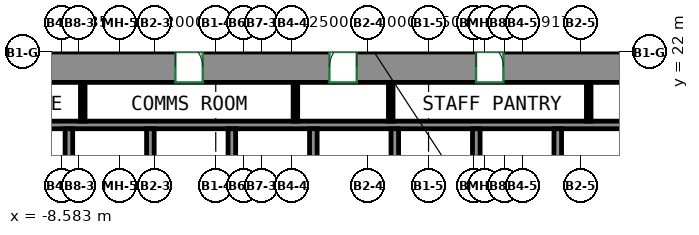
"""IFC4 building model, lengths in metres.
Left out: names, types, materials, properties, quantities, classifications, styles, units other than length and angle.
Written with IfcOpenShell. Run it as: python <this file> out.ifc"""

import sys

from ifc_helpers import new_model, si_unit, direction, frame, frame_2d, origin, place, context, subcontext, project, spatial, rectangle, extrude, source, transform, mapped, element, fill, save


model = new_model("IFC4")
c1 = context("Model", 3, precision=1e-05, world=origin(), true_north=direction((0.0, 1.0)))
c2 = subcontext(c1, "Body", "Model", "MODEL_VIEW")
j1 = project(units=[si_unit("LENGTHUNIT", "METRE"), si_unit("PLANEANGLEUNIT", "RADIAN")], contexts=[c1])
p1 = place(None, origin())
s1 = spatial("IfcSite", under=j1, at=p1, CompositionType="ELEMENT")
p2 = place(p1, origin())
s2 = spatial("IfcBuilding", under=s1, at=p2, CompositionType="ELEMENT")
p3 = place(p2, frame((0.0, 0.0, 27.0)))
s3 = spatial("IfcBuildingStorey", under=s2, at=p3, CompositionType="ELEMENT", Elevation=27.0)
m1 = source(origin(), c2, "Body", "SweptSolid", [
    extrude(rectangle(XDim=34.1, YDim=1.0, at=frame_2d((17.05, 0.0))), origin(), (0.0, 0.0, 1.0), 3.72),
])
p4 = place(p3, frame((-16.0, 21.5, 0.0), z_axis=(0.0, 0.0, 1.0), x_axis=(1.0, 0.0, 0.0)))
e1 = element("IfcWall", 1, at=p4, inside=s3, PredefinedType="SHEAR", context=c2, shape_type="MappedRepresentation", body=[
    mapped(m1, transform((0.0, 0.0, 0.0))),
])
p5 = place(p4, frame((6.108, 0.0, 0.0)))
e2 = element("IfcOpeningElement", 2, at=p5, cuts=e1, PredefinedType="OPENING", context=c2, shape_type="SweptSolid", body=[
    extrude(rectangle(XDim=0.9, YDim=2.1, at=frame_2d((0.45, 1.05))), frame((0.0, 0.51, 0.0), z_axis=(0.0, -1.0, 0.0), x_axis=(1.0, 0.0, 0.0)), (0.0, 0.0, 1.0), 1.02),
])
p6 = place(p4, frame((11.173, 0.0, 0.0)))
e3 = element("IfcOpeningElement", 3, at=p6, cuts=e1, PredefinedType="OPENING", context=c2, shape_type="SweptSolid", body=[
    extrude(rectangle(XDim=0.9, YDim=2.1, at=frame_2d((0.45, 1.05))), frame((0.0, 0.51, 0.0), z_axis=(0.0, -1.0, 0.0), x_axis=(1.0, 0.0, 0.0)), (0.0, 0.0, 1.0), 1.02),
])
p7 = place(p4, frame((16.238, 0.0, 0.0)))
e4 = element("IfcOpeningElement", 4, at=p7, cuts=e1, PredefinedType="OPENING", context=c2, shape_type="SweptSolid", body=[
    extrude(rectangle(XDim=0.9, YDim=2.1, at=frame_2d((0.45, 1.05))), frame((0.0, 0.51, 0.0), z_axis=(0.0, -1.0, 0.0), x_axis=(1.0, 0.0, 0.0)), (0.0, 0.0, 1.0), 1.02),
])
p8 = place(p4, frame((21.062, 0.0, 0.0)))
e5 = element("IfcOpeningElement", 5, at=p8, cuts=e1, PredefinedType="OPENING", context=c2, shape_type="SweptSolid", body=[
    extrude(rectangle(XDim=0.9, YDim=2.1, at=frame_2d((0.45, 1.05))), frame((0.0, 0.51, 0.0), z_axis=(0.0, -1.0, 0.0), x_axis=(1.0, 0.0, 0.0)), (0.0, 0.0, 1.0), 1.02),
])
p9 = place(p4, frame((26.489, 0.0, 0.0)))
e6 = element("IfcOpeningElement", 6, at=p9, cuts=e1, PredefinedType="OPENING", context=c2, shape_type="SweptSolid", body=[
    extrude(rectangle(XDim=0.9, YDim=2.1, at=frame_2d((0.45, 1.05))), frame((0.0, 0.51, 0.0), z_axis=(0.0, -1.0, 0.0), x_axis=(1.0, 0.0, 0.0)), (0.0, 0.0, 1.0), 1.02),
])
p10 = place(p4, frame((2.525, 0.0, 0.0)))
e7 = element("IfcOpeningElement", 7, at=p10, cuts=e1, PredefinedType="OPENING", context=c2, shape_type="SweptSolid", body=[
    extrude(rectangle(XDim=0.9, YDim=2.1, at=frame_2d((0.45, 1.05))), frame((0.0, 0.51, 0.0), z_axis=(0.0, -1.0, 0.0), x_axis=(1.0, 0.0, 0.0)), (0.0, 0.0, 1.0), 1.02),
])
p11 = place(p4, frame((30.675, 0.0, 0.0)))
e8 = element("IfcOpeningElement", 8, at=p11, cuts=e1, PredefinedType="OPENING", context=c2, shape_type="SweptSolid", body=[
    extrude(rectangle(XDim=0.9, YDim=2.1, at=frame_2d((0.45, 1.05))), frame((0.0, 0.51, 0.0), z_axis=(0.0, -1.0, 0.0), x_axis=(1.0, 0.0, 0.0)), (0.0, 0.0, 1.0), 1.02),
])
m2 = source(origin(), c2, "Body", "SweptSolid", [
    extrude(rectangle(XDim=24.37, YDim=0.25, at=frame_2d((12.185, 0.0))), origin(), (0.0, 0.0, 1.0), 3.72),
])
p12 = place(p3, frame((-11.135, 19.6, 0.0), z_axis=(0.0, 0.0, 1.0), x_axis=(1.0, 0.0, 0.0)))
e9 = element("IfcWall", 9, at=p12, inside=s3, PredefinedType="PARTITIONING", context=c2, shape_type="MappedRepresentation", body=[
    mapped(m2, transform((0.0, 0.0, 0.0))),
])
m3 = source(origin(), c2, "Body", "SweptSolid", [
    extrude(rectangle(XDim=3.275, YDim=0.25, at=frame_2d((1.638, 0.0))), origin(), (0.0, 0.0, 1.0), 3.72),
])
for number, where, z_axis, x_axis in (
    (10, (2.39, 16.2, 0.0), (0.0, 0.0, 1.0), (0.0, 1.0, 0.0)),
    (11, (5.07, 16.2, 0.0), (0.0, 0.0, 1.0), (0.0, 1.0, 0.0)),
    (12, (7.75, 16.2, 0.0), (0.0, 0.0, 1.0), (0.0, 1.0, 0.0)),
    (13, (-0.29, 16.2, 0.0), (0.0, 0.0, 1.0), (0.0, 1.0, 0.0)),
    (14, (-2.97, 16.2, 0.0), (0.0, 0.0, 1.0), (0.0, 1.0, 0.0)),
    (15, (-5.65, 16.2, 0.0), (0.0, 0.0, 1.0), (0.0, 1.0, 0.0)),
    (16, (-8.33, 16.2, 0.0), (0.0, 0.0, 1.0), (0.0, 1.0, 0.0)),
):
    element("IfcWall", number, at=place(p3, frame(where, z_axis=z_axis, x_axis=x_axis)), inside=s3, PredefinedType="PARTITIONING", context=c2, shape_type="MappedRepresentation", body=[
        mapped(m3, transform((0.0, 0.0, 0.0))),
    ])
m4 = source(origin(), c2, "Body", "SweptSolid", [
    extrude(rectangle(XDim=1.275, YDim=0.15, at=frame_2d((0.637, 0.0))), origin(), (0.0, 0.0, 1.0), 3.72),
])
for number, where, z_axis, x_axis in (
    (17, (-7.875, 19.725, 0.0), (0.0, 0.0, 1.0), (0.0, 1.0, 0.0)),
    (18, (-0.88, 19.725, 0.0), (0.0, 0.0, 1.0), (0.0, 1.0, 0.0)),
    (19, (2.256, 19.725, 0.0), (0.0, 0.0, 1.0), (0.0, 1.0, 0.0)),
    (20, (8.768, 19.725, 0.0), (0.0, 0.0, 1.0), (0.0, 1.0, 0.0)),
):
    element("IfcWall", number, at=place(p3, frame(where, z_axis=z_axis, x_axis=x_axis)), inside=s3, PredefinedType="PARTITIONING", context=c2, shape_type="MappedRepresentation", body=[
        mapped(m4, transform((0.0, 0.0, 0.0))),
    ])
p13 = place(p6, origin())
e21 = element("IfcDoor", 21, at=p13, inside=s3, OperationType="SINGLE_SWING_LEFT", PredefinedType="DOOR", context=c2, shape_type="SweptSolid", body=[
    extrude(rectangle(XDim=0.9, YDim=2.1, at=frame_2d((0.45, 1.05))), frame((0.0, -0.355, 0.0), z_axis=(0.0, -1.0, 0.0), x_axis=(1.0, 0.0, 0.0)), (0.0, 0.0, 1.0), 0.05),
])
fill(e3, e21)
p14 = place(p7, origin())
e22 = element("IfcDoor", 22, at=p14, inside=s3, OperationType="SINGLE_SWING_RIGHT", PredefinedType="DOOR", context=c2, shape_type="SweptSolid", body=[
    extrude(rectangle(XDim=0.9, YDim=2.1, at=frame_2d((0.45, 1.05))), frame((0.0, -0.355, 0.0), z_axis=(0.0, -1.0, 0.0), x_axis=(1.0, 0.0, 0.0)), (0.0, 0.0, 1.0), 0.05),
])
fill(e4, e22)
p15 = place(p8, origin())
e23 = element("IfcDoor", 23, at=p15, inside=s3, OperationType="SINGLE_SWING_LEFT", PredefinedType="DOOR", context=c2, shape_type="SweptSolid", body=[
    extrude(rectangle(XDim=0.9, YDim=2.1, at=frame_2d((0.45, 1.05))), frame((0.0, -0.355, 0.0), z_axis=(0.0, -1.0, 0.0), x_axis=(1.0, 0.0, 0.0)), (0.0, 0.0, 1.0), 0.05),
])
fill(e5, e23)
save(model, sys.argv[1])
